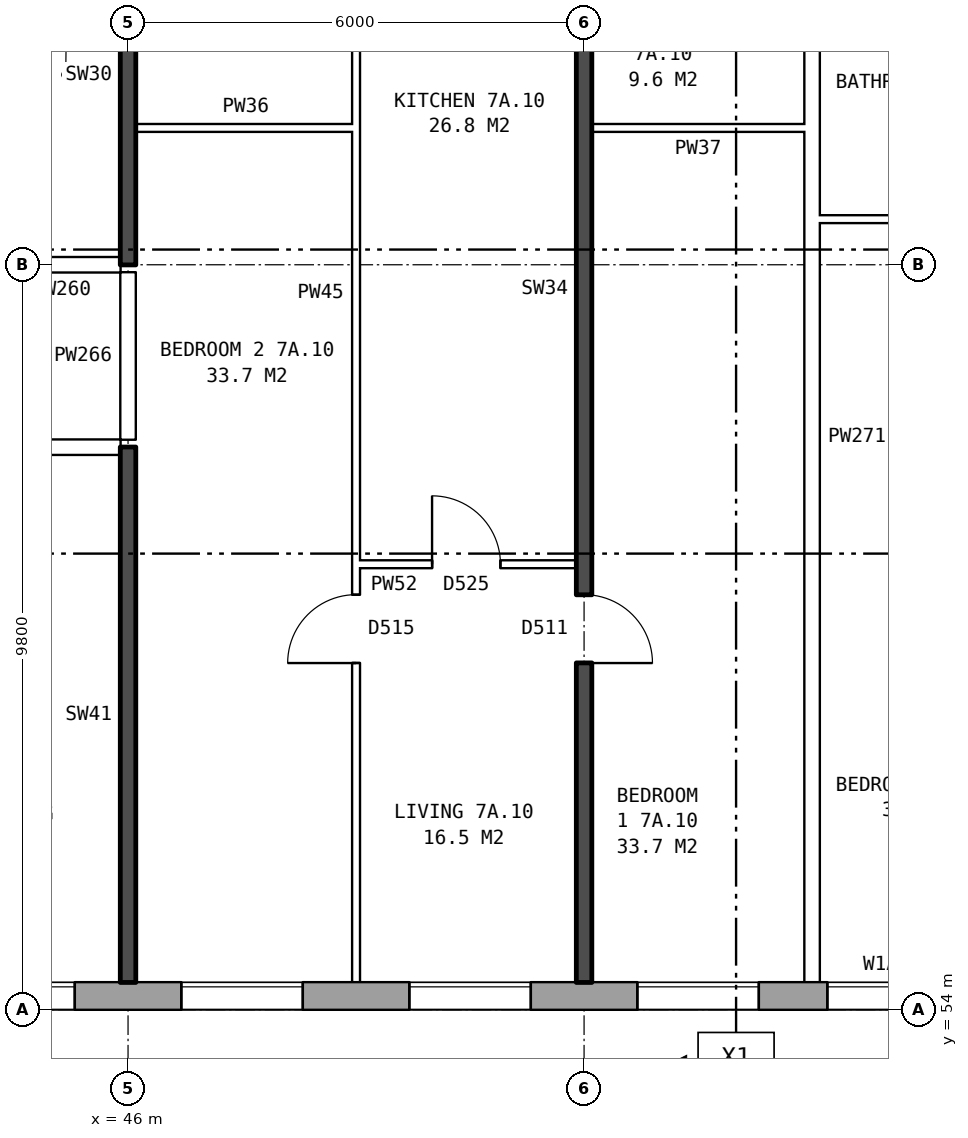
"""IFC4 building model, lengths in metres.
Left out: names, types, materials, properties, quantities, classifications, styles, units other than length and angle.
Written with IfcOpenShell. Run it as: python <this file> out.ifc"""

import sys

from ifc_helpers import new_model, si_unit, direction, frame, frame_2d, origin, place, context, subcontext, project, spatial, rectangle, extrude, element, fill, save


model = new_model("IFC4")
c1 = context("Model", 3, precision=1e-05, world=origin(), true_north=direction((0.0, 1.0)))
c2 = subcontext(c1, "Body", "Model", "MODEL_VIEW")
j1 = project(units=[si_unit("LENGTHUNIT", "METRE"), si_unit("PLANEANGLEUNIT", "RADIAN")], contexts=[c1])
p1 = place(None, origin())
s1 = spatial("IfcSite", under=j1, at=p1, CompositionType="ELEMENT")
p2 = place(p1, origin())
s2 = spatial("IfcBuilding", under=s1, at=p2, CompositionType="ELEMENT")
p3 = place(p2, frame((0.0, 0.0, 28.8)))
s3 = spatial("IfcBuildingStorey", under=s2, at=p3, CompositionType="ELEMENT", Elevation=28.8)
p4 = place(p3, frame((22.825, 54.18, 0.0), z_axis=(0.0, 0.0, 1.0), x_axis=(1.0, 0.0, 0.0)))
e1 = element("IfcWall", 1, at=p4, inside=s3, PredefinedType="STANDARD", context=c2, shape_type="SweptSolid", body=[
    extrude(rectangle(XDim=50.101, YDim=0.36, at=frame_2d((25.05, 0.0))), origin(), (0.0, 0.0, 1.0), 2.85),
])
p5 = place(p4, frame((2.875, 0.0, 0.8)))
e2 = element("IfcOpeningElement", 2, at=p5, cuts=e1, PredefinedType="OPENING", context=c2, shape_type="SweptSolid", body=[
    extrude(rectangle(XDim=1.6, YDim=1.8, at=frame_2d((0.8, 0.9))), frame((0.0, 0.19, 0.0), z_axis=(0.0, -1.0, 0.0), x_axis=(1.0, 0.0, 0.0)), (0.0, 0.0, 1.0), 0.38),
])
p6 = place(p4, frame((5.875, 0.0, 0.8)))
e3 = element("IfcOpeningElement", 3, at=p6, cuts=e1, PredefinedType="OPENING", context=c2, shape_type="SweptSolid", body=[
    extrude(rectangle(XDim=1.6, YDim=1.8, at=frame_2d((0.8, 0.9))), frame((0.0, 0.19, 0.0), z_axis=(0.0, -1.0, 0.0), x_axis=(1.0, 0.0, 0.0)), (0.0, 0.0, 1.0), 0.38),
])
p7 = place(p4, frame((8.875, 0.0, 0.8)))
e4 = element("IfcOpeningElement", 4, at=p7, cuts=e1, PredefinedType="OPENING", context=c2, shape_type="SweptSolid", body=[
    extrude(rectangle(XDim=1.6, YDim=1.8, at=frame_2d((0.8, 0.9))), frame((0.0, 0.19, 0.0), z_axis=(0.0, -1.0, 0.0), x_axis=(1.0, 0.0, 0.0)), (0.0, 0.0, 1.0), 0.38),
])
p8 = place(p4, frame((11.375, 0.0, 1.0)))
e5 = element("IfcOpeningElement", 5, at=p8, cuts=e1, PredefinedType="OPENING", context=c2, shape_type="SweptSolid", body=[
    extrude(rectangle(XDim=1.0, YDim=1.5, at=frame_2d((0.5, 0.75))), frame((0.0, 0.19, 0.0), z_axis=(0.0, -1.0, 0.0), x_axis=(1.0, 0.0, 0.0)), (0.0, 0.0, 1.0), 0.38),
])
p9 = place(p4, frame((12.675, 0.0, 1.6)))
e6 = element("IfcOpeningElement", 6, at=p9, cuts=e1, PredefinedType="OPENING", context=c2, shape_type="SweptSolid", body=[
    extrude(rectangle(XDim=0.6, YDim=0.9, at=frame_2d((0.3, 0.45))), frame((0.0, 0.19, 0.0), z_axis=(0.0, -1.0, 0.0), x_axis=(1.0, 0.0, 0.0)), (0.0, 0.0, 1.0), 0.38),
])
p10 = place(p4, frame((17.875, 0.0, 0.8)))
e7 = element("IfcOpeningElement", 7, at=p10, cuts=e1, PredefinedType="OPENING", context=c2, shape_type="SweptSolid", body=[
    extrude(rectangle(XDim=1.6, YDim=1.8, at=frame_2d((0.8, 0.9))), frame((0.0, 0.19, 0.0), z_axis=(0.0, -1.0, 0.0), x_axis=(1.0, 0.0, 0.0)), (0.0, 0.0, 1.0), 0.38),
])
p11 = place(p4, frame((20.875, 0.0, 0.8)))
e8 = element("IfcOpeningElement", 8, at=p11, cuts=e1, PredefinedType="OPENING", context=c2, shape_type="SweptSolid", body=[
    extrude(rectangle(XDim=1.6, YDim=1.8, at=frame_2d((0.8, 0.9))), frame((0.0, 0.19, 0.0), z_axis=(0.0, -1.0, 0.0), x_axis=(1.0, 0.0, 0.0)), (0.0, 0.0, 1.0), 0.38),
])
p12 = place(p4, frame((23.875, 0.0, 0.8)))
e9 = element("IfcOpeningElement", 9, at=p12, cuts=e1, PredefinedType="OPENING", context=c2, shape_type="SweptSolid", body=[
    extrude(rectangle(XDim=1.6, YDim=1.8, at=frame_2d((0.8, 0.9))), frame((0.0, 0.19, 0.0), z_axis=(0.0, -1.0, 0.0), x_axis=(1.0, 0.0, 0.0)), (0.0, 0.0, 1.0), 0.38),
])
p13 = place(p4, frame((26.875, 0.0, 0.8)))
e10 = element("IfcOpeningElement", 10, at=p13, cuts=e1, PredefinedType="OPENING", context=c2, shape_type="SweptSolid", body=[
    extrude(rectangle(XDim=1.6, YDim=1.8, at=frame_2d((0.8, 0.9))), frame((0.0, 0.19, 0.0), z_axis=(0.0, -1.0, 0.0), x_axis=(1.0, 0.0, 0.0)), (0.0, 0.0, 1.0), 0.38),
])
p14 = place(p4, frame((29.875, 0.0, 0.8)))
e11 = element("IfcOpeningElement", 11, at=p14, cuts=e1, PredefinedType="OPENING", context=c2, shape_type="SweptSolid", body=[
    extrude(rectangle(XDim=1.6, YDim=1.8, at=frame_2d((0.8, 0.9))), frame((0.0, 0.19, 0.0), z_axis=(0.0, -1.0, 0.0), x_axis=(1.0, 0.0, 0.0)), (0.0, 0.0, 1.0), 0.38),
])
p15 = place(p4, frame((32.375, 0.0, 0.8)))
e12 = element("IfcOpeningElement", 12, at=p15, cuts=e1, PredefinedType="OPENING", context=c2, shape_type="SweptSolid", body=[
    extrude(rectangle(XDim=1.4, YDim=1.8, at=frame_2d((0.7, 0.9))), frame((0.0, 0.19, 0.0), z_axis=(0.0, -1.0, 0.0), x_axis=(1.0, 0.0, 0.0)), (0.0, 0.0, 1.0), 0.38),
])
p16 = place(p4, frame((35.375, 0.0, 0.15)))
e13 = element("IfcOpeningElement", 13, at=p16, cuts=e1, PredefinedType="OPENING", context=c2, shape_type="SweptSolid", body=[
    extrude(rectangle(XDim=0.8, YDim=0.9, at=frame_2d((0.4, 0.45))), frame((0.0, 0.19, 0.0), z_axis=(0.0, -1.0, 0.0), x_axis=(1.0, 0.0, 0.0)), (0.0, 0.0, 1.0), 0.38),
])
p17 = place(p4, frame((38.875, 0.0, 0.8)))
e14 = element("IfcOpeningElement", 14, at=p17, cuts=e1, PredefinedType="OPENING", context=c2, shape_type="SweptSolid", body=[
    extrude(rectangle(XDim=1.6, YDim=1.8, at=frame_2d((0.8, 0.9))), frame((0.0, 0.19, 0.0), z_axis=(0.0, -1.0, 0.0), x_axis=(1.0, 0.0, 0.0)), (0.0, 0.0, 1.0), 0.38),
])
p18 = place(p4, frame((41.875, 0.0, 0.8)))
e15 = element("IfcOpeningElement", 15, at=p18, cuts=e1, PredefinedType="OPENING", context=c2, shape_type="SweptSolid", body=[
    extrude(rectangle(XDim=1.6, YDim=1.8, at=frame_2d((0.8, 0.9))), frame((0.0, 0.19, 0.0), z_axis=(0.0, -1.0, 0.0), x_axis=(1.0, 0.0, 0.0)), (0.0, 0.0, 1.0), 0.38),
])
p19 = place(p4, frame((44.875, 0.0, 0.8)))
e16 = element("IfcOpeningElement", 16, at=p19, cuts=e1, PredefinedType="OPENING", context=c2, shape_type="SweptSolid", body=[
    extrude(rectangle(XDim=1.6, YDim=1.8, at=frame_2d((0.8, 0.9))), frame((0.0, 0.19, 0.0), z_axis=(0.0, -1.0, 0.0), x_axis=(1.0, 0.0, 0.0)), (0.0, 0.0, 1.0), 0.38),
])
p20 = place(p4, frame((47.875, 0.0, 0.8)))
e17 = element("IfcOpeningElement", 17, at=p20, cuts=e1, PredefinedType="OPENING", context=c2, shape_type="SweptSolid", body=[
    extrude(rectangle(XDim=1.6, YDim=1.8, at=frame_2d((0.8, 0.9))), frame((0.0, 0.19, 0.0), z_axis=(0.0, -1.0, 0.0), x_axis=(1.0, 0.0, 0.0)), (0.0, 0.0, 1.0), 0.38),
])
p21 = place(p4, frame((14.825, 0.0, 0.8)))
e18 = element("IfcOpeningElement", 18, at=p21, cuts=e1, PredefinedType="OPENING", context=c2, shape_type="SweptSolid", body=[
    extrude(rectangle(XDim=0.6, YDim=0.9, at=frame_2d((0.3, 0.45))), frame((0.0, 0.19, 0.0), z_axis=(0.0, -1.0, 0.0), x_axis=(1.0, 0.0, 0.0)), (0.0, 0.0, 1.0), 0.38),
])
p22 = place(p4, frame((15.775, 0.0, 0.8)))
e19 = element("IfcOpeningElement", 19, at=p22, cuts=e1, PredefinedType="OPENING", context=c2, shape_type="SweptSolid", body=[
    extrude(rectangle(XDim=1.2, YDim=1.5, at=frame_2d((0.6, 0.75))), frame((0.0, 0.19, 0.0), z_axis=(0.0, -1.0, 0.0), x_axis=(1.0, 0.0, 0.0)), (0.0, 0.0, 1.0), 0.38),
])
p23 = place(p4, frame((34.075, 0.0, 0.8)))
e20 = element("IfcOpeningElement", 20, at=p23, cuts=e1, PredefinedType="OPENING", context=c2, shape_type="SweptSolid", body=[
    extrude(rectangle(XDim=0.6, YDim=1.2, at=frame_2d((0.3, 0.6))), frame((0.0, 0.19, 0.0), z_axis=(0.0, -1.0, 0.0), x_axis=(1.0, 0.0, 0.0)), (0.0, 0.0, 1.0), 0.38),
])
p24 = place(p4, frame((36.725, 0.0, 1.65)))
e21 = element("IfcOpeningElement", 21, at=p24, cuts=e1, PredefinedType="OPENING", context=c2, shape_type="SweptSolid", body=[
    extrude(rectangle(XDim=1.2, YDim=0.9, at=frame_2d((0.6, 0.45))), frame((0.0, 0.19, 0.0), z_axis=(0.0, -1.0, 0.0), x_axis=(1.0, 0.0, 0.0)), (0.0, 0.0, 1.0), 0.38),
])
p25 = place(p3, frame((49.0, 59.86, 0.0), z_axis=(0.0, 0.0, 1.0), x_axis=(1.0, 0.0, 0.0)))
e22 = element("IfcWall", 22, at=p25, inside=s3, PredefinedType="PARTITIONING", context=c2, shape_type="SweptSolid", body=[
    extrude(rectangle(XDim=2.9, YDim=0.1, at=frame_2d((1.45, 0.0))), origin(), (0.0, 0.0, 1.0), 2.85),
])
p26 = place(p25, frame((1.0, 0.0, 0.0)))
e23 = element("IfcOpeningElement", 23, at=p26, cuts=e22, PredefinedType="OPENING", context=c2, shape_type="SweptSolid", body=[
    extrude(rectangle(XDim=0.9, YDim=2.1, at=frame_2d((0.45, 1.05))), frame((0.0, 0.06, 0.0), z_axis=(0.0, -1.0, 0.0), x_axis=(1.0, 0.0, 0.0)), (0.0, 0.0, 1.0), 0.12),
])
p27 = place(p3, frame((20.11, 61.4, 0.0), z_axis=(0.0, 0.0, 1.0), x_axis=(1.0, 0.0, 0.0)))
e24 = element("IfcWall", 24, at=p27, inside=s3, PredefinedType="PARTITIONING", context=c2, shape_type="SweptSolid", body=[
    extrude(rectangle(XDim=25.79, YDim=0.2, at=frame_2d((12.895, 0.0))), origin(), (0.0, 0.0, 1.0), 2.85),
])
p28 = place(p27, frame((23.34, 0.0, 0.0)))
e25 = element("IfcOpeningElement", 25, at=p28, cuts=e24, PredefinedType="OPENING", context=c2, shape_type="SweptSolid", body=[
    extrude(rectangle(XDim=1.0, YDim=2.1, at=frame_2d((0.5, 1.05))), frame((0.0, 0.11, 0.0), z_axis=(0.0, -1.0, 0.0), x_axis=(1.0, 0.0, 0.0)), (0.0, 0.0, 1.0), 0.22),
])
p29 = place(p27, frame((17.39, 0.0, 0.0)))
e26 = element("IfcOpeningElement", 26, at=p29, cuts=e24, PredefinedType="OPENING", context=c2, shape_type="SweptSolid", body=[
    extrude(rectangle(XDim=1.0, YDim=2.1, at=frame_2d((0.5, 1.05))), frame((0.0, 0.11, 0.0), z_axis=(0.0, -1.0, 0.0), x_axis=(1.0, 0.0, 0.0)), (0.0, 0.0, 1.0), 0.22),
])
p30 = place(p27, frame((11.39, 0.0, 0.0)))
e27 = element("IfcOpeningElement", 27, at=p30, cuts=e24, PredefinedType="OPENING", context=c2, shape_type="SweptSolid", body=[
    extrude(rectangle(XDim=1.0, YDim=2.1, at=frame_2d((0.5, 1.05))), frame((0.0, 0.11, 0.0), z_axis=(0.0, -1.0, 0.0), x_axis=(1.0, 0.0, 0.0)), (0.0, 0.0, 1.0), 0.22),
])
p31 = place(p27, frame((2.245, 0.0, 0.0)))
e28 = element("IfcOpeningElement", 28, at=p31, cuts=e24, PredefinedType="OPENING", context=c2, shape_type="SweptSolid", body=[
    extrude(rectangle(XDim=1.0, YDim=2.1, at=frame_2d((0.5, 1.05))), frame((0.0, 0.11, 0.0), z_axis=(0.0, -1.0, 0.0), x_axis=(1.0, 0.0, 0.0)), (0.0, 0.0, 1.0), 0.22),
])
p32 = place(p3, frame((44.36, 63.8, 0.0), z_axis=(0.0, 0.0, 1.0), x_axis=(1.0, 0.0, 0.0)))
e29 = element("IfcWall", 29, at=p32, inside=s3, PredefinedType="PARTITIONING", context=c2, shape_type="SweptSolid", body=[
    extrude(rectangle(XDim=1.54, YDim=0.2, at=frame_2d((0.77, 0.0))), origin(), (0.0, 0.0, 1.0), 2.85),
])
p33 = place(p3, frame((55.1, 64.4, 0.0), z_axis=(0.0, 0.0, 1.0), x_axis=(1.0, 0.0, 0.0)))
e30 = element("IfcWall", 30, at=p33, inside=s3, PredefinedType="PARTITIONING", context=c2, shape_type="SweptSolid", body=[
    extrude(rectangle(XDim=2.8, YDim=0.1, at=frame_2d((1.4, 0.0))), origin(), (0.0, 0.0, 1.0), 2.85),
])
p34 = place(p3, frame((46.1, 65.6, 0.0), z_axis=(0.0, 0.0, 1.0), x_axis=(1.0, 0.0, 0.0)))
e31 = element("IfcWall", 31, at=p34, inside=s3, PredefinedType="PARTITIONING", context=c2, shape_type="SweptSolid", body=[
    extrude(rectangle(XDim=2.9, YDim=0.1, at=frame_2d((1.45, 0.0))), origin(), (0.0, 0.0, 1.0), 2.85),
])
p35 = place(p3, frame((52.1, 65.6, 0.0), z_axis=(0.0, 0.0, 1.0), x_axis=(1.0, 0.0, 0.0)))
e32 = element("IfcWall", 32, at=p35, inside=s3, PredefinedType="PARTITIONING", context=c2, shape_type="SweptSolid", body=[
    extrude(rectangle(XDim=2.8, YDim=0.1, at=frame_2d((1.4, 0.0))), origin(), (0.0, 0.0, 1.0), 2.85),
])
p36 = place(p3, frame((46.0, 54.36, 0.0), z_axis=(0.0, 0.0, 1.0), x_axis=(0.0, 1.0, 0.0)))
e33 = element("IfcWall", 33, at=p36, inside=s3, PredefinedType="SOLIDWALL", context=c2, shape_type="SweptSolid", body=[
    extrude(rectangle(XDim=7.04, YDim=0.2, at=frame_2d((3.52, 0.0))), origin(), (0.0, 0.0, 1.0), 2.85),
])
p37 = place(p3, frame((46.0, 61.5, 0.0), z_axis=(0.0, 0.0, 1.0), x_axis=(0.0, 1.0, 0.0)))
e34 = element("IfcWall", 34, at=p37, inside=s3, PredefinedType="PARTITIONING", context=c2, shape_type="SweptSolid", body=[
    extrude(rectangle(XDim=2.2, YDim=0.2, at=frame_2d((1.1, 0.0))), origin(), (0.0, 0.0, 1.0), 2.85),
])
p38 = place(p3, frame((46.0, 63.8, 0.0), z_axis=(0.0, 0.0, 1.0), x_axis=(0.0, 1.0, 0.0)))
e35 = element("IfcWall", 35, at=p38, inside=s3, PredefinedType="SOLIDWALL", context=c2, shape_type="SweptSolid", body=[
    extrude(rectangle(XDim=5.0, YDim=0.2, at=frame_2d((2.5, 0.0))), origin(), (0.0, 0.0, 1.0), 2.85),
])
p39 = place(p3, frame((49.0, 54.36, 0.0), z_axis=(0.0, 0.0, 1.0), x_axis=(0.0, 1.0, 0.0)))
e36 = element("IfcWall", 36, at=p39, inside=s3, PredefinedType="PARTITIONING", context=c2, shape_type="SweptSolid", body=[
    extrude(rectangle(XDim=14.34, YDim=0.1, at=frame_2d((7.17, 0.0))), origin(), (0.0, 0.0, 1.0), 2.85),
])
p40 = place(p39, frame((4.2, 0.0, 0.0)))
e37 = element("IfcOpeningElement", 37, at=p40, cuts=e36, PredefinedType="OPENING", context=c2, shape_type="SweptSolid", body=[
    extrude(rectangle(XDim=0.9, YDim=2.1, at=frame_2d((0.45, 1.05))), frame((0.0, 0.06, 0.0), z_axis=(0.0, -1.0, 0.0), x_axis=(1.0, 0.0, 0.0)), (0.0, 0.0, 1.0), 0.12),
])
p41 = place(p39, frame((13.04, 0.0, 0.0)))
e38 = element("IfcOpeningElement", 38, at=p41, cuts=e36, PredefinedType="OPENING", context=c2, shape_type="SweptSolid", body=[
    extrude(rectangle(XDim=0.9, YDim=2.1, at=frame_2d((0.45, 1.05))), frame((0.0, 0.06, 0.0), z_axis=(0.0, -1.0, 0.0), x_axis=(1.0, 0.0, 0.0)), (0.0, 0.0, 1.0), 0.12),
])
p42 = place(p3, frame((52.0, 54.36, 0.0), z_axis=(0.0, 0.0, 1.0), x_axis=(0.0, 1.0, 0.0)))
e39 = element("IfcWall", 39, at=p42, inside=s3, PredefinedType="SOLIDWALL", context=c2, shape_type="SweptSolid", body=[
    extrude(rectangle(XDim=14.44, YDim=0.2, at=frame_2d((7.22, 0.0))), origin(), (0.0, 0.0, 1.0), 2.85),
])
p43 = place(p42, frame((4.2, 0.0, 0.0)))
e40 = element("IfcOpeningElement", 40, at=p43, cuts=e39, PredefinedType="OPENING", context=c2, shape_type="SweptSolid", body=[
    extrude(rectangle(XDim=0.9, YDim=2.1, at=frame_2d((0.45, 1.05))), frame((0.0, 0.11, 0.0), z_axis=(0.0, -1.0, 0.0), x_axis=(1.0, 0.0, 0.0)), (0.0, 0.0, 1.0), 0.22),
])
p44 = place(p42, frame((13.14, 0.0, 0.0)))
e41 = element("IfcOpeningElement", 41, at=p44, cuts=e39, PredefinedType="OPENING", context=c2, shape_type="SweptSolid", body=[
    extrude(rectangle(XDim=0.9, YDim=2.1, at=frame_2d((0.45, 1.05))), frame((0.0, 0.11, 0.0), z_axis=(0.0, -1.0, 0.0), x_axis=(1.0, 0.0, 0.0)), (0.0, 0.0, 1.0), 0.22),
])
p45 = place(p3, frame((55.0, 54.36, 0.0), z_axis=(0.0, 0.0, 1.0), x_axis=(0.0, 1.0, 0.0)))
e42 = element("IfcWall", 42, at=p45, inside=s3, PredefinedType="PARTITIONING", context=c2, shape_type="SweptSolid", body=[
    extrude(rectangle(XDim=14.34, YDim=0.2, at=frame_2d((7.17, 0.0))), origin(), (0.0, 0.0, 1.0), 2.85),
])
p46 = place(p11, origin())
e43 = element("IfcWindow", 43, at=p46, inside=s3, PartitioningType="SINGLE_PANEL", PredefinedType="WINDOW", context=c2, shape_type="SweptSolid", body=[
    extrude(rectangle(XDim=1.6, YDim=1.8, at=frame_2d((0.8, 0.9))), frame((0.0, 0.15, 0.0), z_axis=(0.0, -1.0, 0.0), x_axis=(1.0, 0.0, 0.0)), (0.0, 0.0, 1.0), 0.06),
])
fill(e8, e43)
p47 = place(p12, origin())
e44 = element("IfcWindow", 44, at=p47, inside=s3, PartitioningType="SINGLE_PANEL", PredefinedType="WINDOW", context=c2, shape_type="SweptSolid", body=[
    extrude(rectangle(XDim=1.6, YDim=1.8, at=frame_2d((0.8, 0.9))), frame((0.0, 0.15, 0.0), z_axis=(0.0, -1.0, 0.0), x_axis=(1.0, 0.0, 0.0)), (0.0, 0.0, 1.0), 0.06),
])
fill(e9, e44)
p48 = place(p13, origin())
e45 = element("IfcWindow", 45, at=p48, inside=s3, PartitioningType="SINGLE_PANEL", PredefinedType="WINDOW", context=c2, shape_type="SweptSolid", body=[
    extrude(rectangle(XDim=1.6, YDim=1.8, at=frame_2d((0.8, 0.9))), frame((0.0, 0.15, 0.0), z_axis=(0.0, -1.0, 0.0), x_axis=(1.0, 0.0, 0.0)), (0.0, 0.0, 1.0), 0.06),
])
fill(e10, e45)
p49 = place(p14, origin())
e46 = element("IfcWindow", 46, at=p49, inside=s3, PartitioningType="SINGLE_PANEL", PredefinedType="WINDOW", context=c2, shape_type="SweptSolid", body=[
    extrude(rectangle(XDim=1.6, YDim=1.8, at=frame_2d((0.8, 0.9))), frame((0.0, 0.15, 0.0), z_axis=(0.0, -1.0, 0.0), x_axis=(1.0, 0.0, 0.0)), (0.0, 0.0, 1.0), 0.06),
])
fill(e11, e46)
p50 = place(p15, origin())
e47 = element("IfcWindow", 47, at=p50, inside=s3, PartitioningType="SINGLE_PANEL", PredefinedType="WINDOW", context=c2, shape_type="SweptSolid", body=[
    extrude(rectangle(XDim=1.4, YDim=1.8, at=frame_2d((0.7, 0.9))), frame((0.0, 0.15, 0.0), z_axis=(0.0, -1.0, 0.0), x_axis=(1.0, 0.0, 0.0)), (0.0, 0.0, 1.0), 0.06),
])
fill(e12, e47)
p51 = place(p43, frame((0.9, 0.0, 0.0), z_axis=(0.0, 0.0, 1.0), x_axis=(-1.0, 0.0, 0.0)))
e48 = element("IfcDoor", 48, at=p51, inside=s3, OperationType="SINGLE_SWING_RIGHT", PredefinedType="DOOR", context=c2, shape_type="SweptSolid", body=[
    extrude(rectangle(XDim=0.9, YDim=2.1, at=frame_2d((0.45, 1.05))), frame((0.0, 0.025, 0.0), z_axis=(0.0, -1.0, 0.0), x_axis=(1.0, 0.0, 0.0)), (0.0, 0.0, 1.0), 0.05),
])
fill(e40, e48)
p52 = place(p40, origin())
e49 = element("IfcDoor", 49, at=p52, inside=s3, OperationType="SINGLE_SWING_LEFT", PredefinedType="DOOR", context=c2, shape_type="SweptSolid", body=[
    extrude(rectangle(XDim=0.9, YDim=2.1, at=frame_2d((0.45, 1.05))), frame((0.0, 0.025, 0.0), z_axis=(0.0, -1.0, 0.0), x_axis=(1.0, 0.0, 0.0)), (0.0, 0.0, 1.0), 0.05),
])
fill(e37, e49)
p53 = place(p26, origin())
e50 = element("IfcDoor", 50, at=p53, inside=s3, OperationType="SINGLE_SWING_LEFT", PredefinedType="DOOR", context=c2, shape_type="SweptSolid", body=[
    extrude(rectangle(XDim=0.9, YDim=2.1, at=frame_2d((0.45, 1.05))), frame((0.0, 0.025, 0.0), z_axis=(0.0, -1.0, 0.0), x_axis=(1.0, 0.0, 0.0)), (0.0, 0.0, 1.0), 0.05),
])
fill(e23, e50)
save(model, sys.argv[1])
